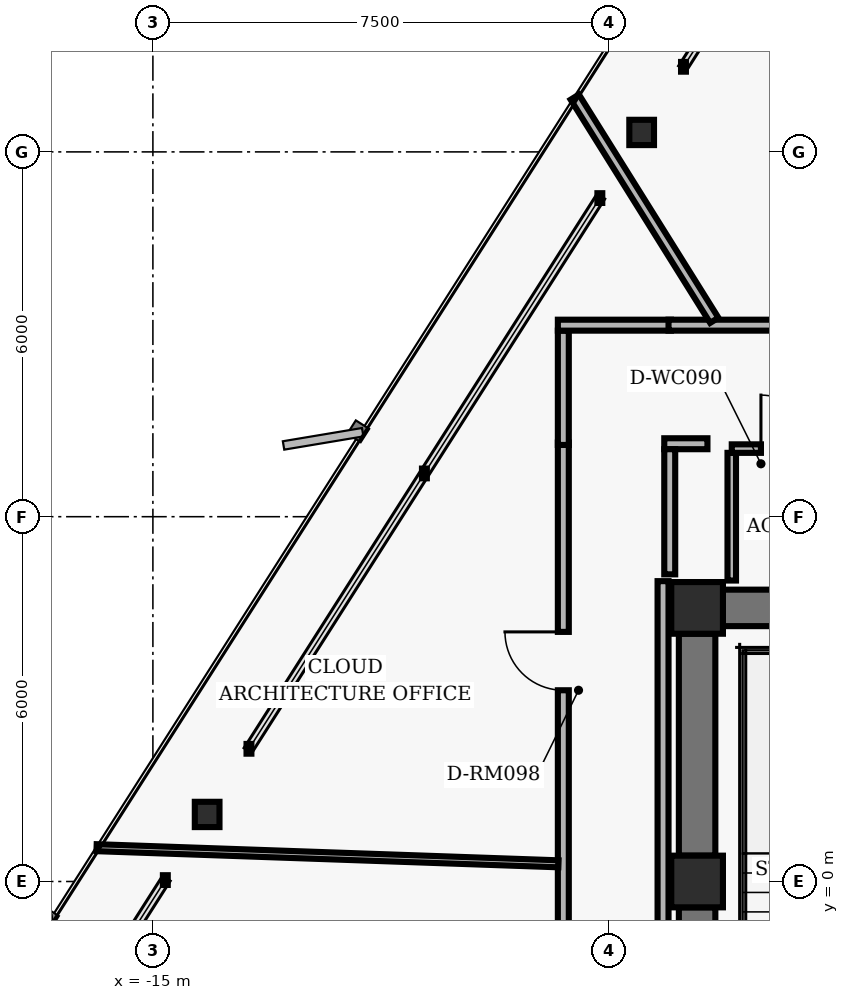
"""IFC4 building model, lengths in metres.
Left out: names, types, materials, properties, quantities, classifications, styles, units other than length and angle.
Written with IfcOpenShell. Run it as: python <this file> out.ifc"""

import sys

from ifc_helpers import new_model, si_unit, direction, frame, frame_2d, origin, origin_2d, place, context, subcontext, project, spatial, rectangle, hollow_rectangle, i_section, extrude, element, fill, save


model = new_model("IFC4")
c1 = context("Model", 3, precision=1e-05, world=origin(), true_north=direction((0.0, 1.0)))
c2 = subcontext(c1, "Body", "Model", "MODEL_VIEW")
j1 = project(units=[si_unit("LENGTHUNIT", "METRE"), si_unit("PLANEANGLEUNIT", "RADIAN")], contexts=[c1])
p1 = place(None, origin())
s1 = spatial("IfcSite", under=j1, at=p1, CompositionType="ELEMENT")
p2 = place(p1, origin())
s2 = spatial("IfcBuilding", under=s1, at=p2, CompositionType="ELEMENT")
p3 = place(p2, frame((0.0, 0.0, 135.04)))
s3 = spatial("IfcBuildingStorey", under=s2, at=p3, CompositionType="ELEMENT", Elevation=135.04)
for number, where, z_axis, x_axis in (
    (1, (-6.05, 4.5, 0.0), (0.0, 0.0, 1.0), (1.0, 0.0, 0.0)),
    (2, (-6.05, 0.0, 0.0), (0.0, 0.0, 1.0), (1.0, 0.0, 0.0)),
):
    element("IfcColumn", number, at=place(p3, frame(where, z_axis=z_axis, x_axis=x_axis)), inside=s3, PredefinedType="COLUMN", context=c2, shape_type="SweptSolid", body=[
        extrude(hollow_rectangle(XDim=0.85, YDim=0.85, WallThickness=0.055, InnerFilletRadius=0.02, OuterFilletRadius=0.04, at=origin_2d()), origin(), (0.0, 0.0, 1.0), 3.04),
    ])
p4 = place(p3, frame((-6.05, 0.425, 0.0), z_axis=(0.0, 0.0, 1.0), x_axis=(0.0, 1.0, 0.0)))
e3 = element("IfcWall", 3, at=p4, inside=s3, PredefinedType="SHEAR", context=c2, shape_type="SweptSolid", body=[
    extrude(rectangle(XDim=3.65, YDim=0.6, at=frame_2d((1.825, 0.0))), origin(), (0.0, 0.0, 1.0), 2.788),
])
p5 = place(p3, frame((-6.05, -3.875, 0.0), z_axis=(0.0, 0.0, 1.0), x_axis=(0.0, 1.0, 0.0)))
e4 = element("IfcWall", 4, at=p5, inside=s3, PredefinedType="SHEAR", context=c2, shape_type="SweptSolid", body=[
    extrude(rectangle(XDim=3.45, YDim=0.6, at=frame_2d((1.725, 0.0))), origin(), (0.0, 0.0, 1.0), 2.788),
])
p6 = place(p3, frame((-5.625, 4.5, 0.0), z_axis=(0.0, 0.0, 1.0), x_axis=(1.0, 0.0, 0.0)))
e5 = element("IfcWall", 5, at=p6, inside=s3, PredefinedType="SHEAR", context=c2, shape_type="SweptSolid", body=[
    extrude(rectangle(XDim=3.575, YDim=0.6, at=frame_2d((1.788, 0.0))), origin(), (0.0, 0.0, 1.0), 2.788),
])
for number, where, z_axis, x_axis in (
    (6, (-6.962, 12.32, 0.0), (0.0, 0.0, 1.0), (1.0, 0.0, 0.0)),
    (7, (-14.108, 1.103, 0.0), (0.0, 0.0, 1.0), (1.0, 0.0, 0.0)),
):
    element("IfcColumn", number, at=place(p3, frame(where, z_axis=z_axis, x_axis=x_axis)), inside=s3, PredefinedType="COLUMN", context=c2, shape_type="SweptSolid", body=[
        extrude(i_section(OverallWidth=0.406, OverallDepth=0.416, WebThickness=0.03, FlangeThickness=0.048, FilletRadius=0.02, at=origin_2d()), origin(), (0.0, 0.0, 1.0), 3.04),
    ])
p7 = place(p3, frame((-5.48, 4.95, 0.0), z_axis=(0.0, 0.0, 1.0), x_axis=(0.0, 1.0, 0.0)))
e8 = element("IfcWall", 8, at=p7, inside=s3, PredefinedType="PARTITIONING", context=c2, shape_type="SweptSolid", body=[
    extrude(rectangle(XDim=2.1, YDim=0.14, at=frame_2d((1.05, 0.0))), origin(), (0.0, 0.0, 1.0), 2.763),
])
p8 = place(p3, frame((-5.48, 7.12, 0.0), z_axis=(0.0, 0.0, 1.0), x_axis=(1.0, 0.0, 0.0)))
e9 = element("IfcWall", 9, at=p8, inside=s3, PredefinedType="PARTITIONING", context=c2, shape_type="SweptSolid", body=[
    extrude(rectangle(XDim=3.36, YDim=0.14, at=frame_2d((1.68, 0.0))), origin(), (0.0, 0.0, 1.0), 2.33),
])
p9 = place(p8, frame((0.48, 0.0, 0.0)))
e10 = element("IfcOpeningElement", 10, at=p9, cuts=e9, PredefinedType="OPENING", context=c2, shape_type="SweptSolid", body=[
    extrude(rectangle(XDim=0.88, YDim=2.02, at=frame_2d((0.44, 1.01))), frame((0.0, 0.08, 0.0), z_axis=(0.0, -1.0, 0.0), x_axis=(1.0, 0.0, 0.0)), (0.0, 0.0, 1.0), 0.16),
])
p10 = place(p8, frame((2.22, 0.0, 0.0)))
e11 = element("IfcOpeningElement", 11, at=p10, cuts=e9, PredefinedType="OPENING", context=c2, shape_type="SweptSolid", body=[
    extrude(rectangle(XDim=0.88, YDim=2.02, at=frame_2d((0.44, 1.01))), frame((0.0, 0.08, 0.0), z_axis=(0.0, -1.0, 0.0), x_axis=(1.0, 0.0, 0.0)), (0.0, 0.0, 1.0), 0.16),
])
p11 = place(p3, frame((-8.25, -7.22, 0.0), z_axis=(0.0, 0.0, 1.0), x_axis=(0.0, 1.0, 0.0)))
e12 = element("IfcWall", 12, at=p11, inside=s3, PredefinedType="PARTITIONING", context=c2, shape_type="SweptSolid", body=[
    extrude(rectangle(XDim=14.44, YDim=0.18, at=frame_2d((7.22, 0.0))), origin(), (0.0, 0.0, 1.0), 2.763),
])
p12 = place(p11, frame((3.406, 0.0, 0.0)))
e13 = element("IfcOpeningElement", 13, at=p12, cuts=e12, PredefinedType="OPENING", context=c2, shape_type="SweptSolid", body=[
    extrude(rectangle(XDim=0.96, YDim=2.02, at=frame_2d((0.48, 1.01))), frame((0.0, 0.1, 0.0), z_axis=(0.0, -1.0, 0.0), x_axis=(1.0, 0.0, 0.0)), (0.0, 0.0, 1.0), 0.2),
])
p13 = place(p11, frame((10.365, 0.0, 0.0)))
e14 = element("IfcOpeningElement", 14, at=p13, cuts=e12, PredefinedType="OPENING", context=c2, shape_type="SweptSolid", body=[
    extrude(rectangle(XDim=0.96, YDim=2.02, at=frame_2d((0.48, 1.01))), frame((0.0, 0.1, 0.0), z_axis=(0.0, -1.0, 0.0), x_axis=(1.0, 0.0, 0.0)), (0.0, 0.0, 1.0), 0.2),
])
p14 = place(p3, frame((-8.25, 7.18, 0.0), z_axis=(0.0, 0.0, 1.0), x_axis=(0.0, 1.0, 0.0)))
e15 = element("IfcWall", 15, at=p14, inside=s3, PredefinedType="PARTITIONING", context=c2, shape_type="SweptSolid", body=[
    extrude(rectangle(XDim=1.88, YDim=0.18, at=frame_2d((0.94, 0.0))), origin(), (0.0, 0.0, 1.0), 2.763),
])
p15 = place(p3, frame((-8.34, 9.15, 0.0), z_axis=(0.0, 0.0, 1.0), x_axis=(1.0, 0.0, 0.0)))
e16 = element("IfcWall", 16, at=p15, inside=s3, PredefinedType="PARTITIONING", context=c2, shape_type="SweptSolid", body=[
    extrude(rectangle(XDim=1.86, YDim=0.18, at=frame_2d((0.93, 0.0))), origin(), (0.0, 0.0, 1.0), 2.763),
])
p16 = place(p3, frame((-6.52, 9.15, 0.0), z_axis=(0.0, 0.0, 1.0), x_axis=(1.0, 0.0, 0.0)))
e17 = element("IfcWall", 17, at=p16, inside=s3, PredefinedType="PARTITIONING", context=c2, shape_type="SweptSolid", body=[
    extrude(rectangle(XDim=16.572, YDim=0.18, at=frame_2d((8.286, 0.0))), origin(), (0.0, 0.0, 1.0), 2.33),
])
p17 = place(p16, frame((5.789, 0.0, 0.0)))
e18 = element("IfcOpeningElement", 18, at=p17, cuts=e17, PredefinedType="OPENING", context=c2, shape_type="SweptSolid", body=[
    extrude(rectangle(XDim=1.02, YDim=2.02, at=frame_2d((0.51, 1.01))), frame((0.0, 0.1, 0.0), z_axis=(0.0, -1.0, 0.0), x_axis=(1.0, 0.0, 0.0)), (0.0, 0.0, 1.0), 0.2),
])
p18 = place(p3, frame((-5.88, 7.2, 0.0), z_axis=(0.0, 0.0, 1.0), x_axis=(-1.0, 0.0, 0.0)))
e19 = element("IfcWall", 19, at=p18, inside=s3, PredefinedType="PARTITIONING", context=c2, shape_type="SweptSolid", body=[
    extrude(rectangle(XDim=0.71, YDim=0.18, at=frame_2d((0.355, 0.0))), origin(), (0.0, 0.0, 1.0), 2.33),
])
p19 = place(p3, frame((-6.5, 7.11, 0.0), z_axis=(0.0, 0.0, 1.0), x_axis=(0.0, -1.0, 0.0)))
e20 = element("IfcWall", 20, at=p19, inside=s3, PredefinedType="PARTITIONING", context=c2, shape_type="SweptSolid", body=[
    extrude(rectangle(XDim=2.058, YDim=0.18, at=frame_2d((1.029, 0.0))), origin(), (0.0, 0.0, 1.0), 2.132),
])
p20 = place(p3, frame((-6.61, 4.94, 0.0), z_axis=(0.0, 0.0, 1.0), x_axis=(0.0, -1.0, 0.0)))
e21 = element("IfcWall", 21, at=p20, inside=s3, PredefinedType="PARTITIONING", context=c2, shape_type="SweptSolid", body=[
    extrude(rectangle(XDim=9.46, YDim=0.18, at=frame_2d((4.73, 0.0))), origin(), (0.0, 0.0, 1.0), 2.763),
])
p21 = place(p3, frame((-5.768, 9.23, 0.0), z_axis=(0.0, 0.0, 1.0), x_axis=(-0.529887412725, 0.848067998356, 0.0)))
e22 = element("IfcWall", 22, at=p21, inside=s3, PredefinedType="PARTITIONING", context=c2, shape_type="SweptSolid", body=[
    extrude(rectangle(XDim=4.329, YDim=0.16, at=frame_2d((2.165, 0.0))), origin(), (0.0, 0.0, 1.0), 2.763),
])
p22 = place(p3, frame((-8.33, 0.291, 0.0), z_axis=(0.0, 0.0, 1.0), x_axis=(-0.999391414835, 0.034882659784, 0.0)))
e23 = element("IfcWall", 23, at=p22, inside=s3, PredefinedType="MOVABLE", context=c2, shape_type="SweptSolid", body=[
    extrude(rectangle(XDim=7.601, YDim=0.115, at=frame_2d((3.8, 0.0))), origin(), (0.0, 0.0, 1.0), 2.132),
])
p23 = place(p9, origin())
e24 = element("IfcDoor", 24, at=p23, inside=s3, OperationType="SINGLE_SWING_LEFT", PredefinedType="DOOR", context=c2, shape_type="SweptSolid", body=[
    extrude(rectangle(XDim=0.88, YDim=2.02, at=frame_2d((0.44, 1.01))), frame((0.0, 0.025, 0.0), z_axis=(0.0, -1.0, 0.0), x_axis=(1.0, 0.0, 0.0)), (0.0, 0.0, 1.0), 0.05),
])
fill(e10, e24)
p24 = place(p13, origin())
e25 = element("IfcDoor", 25, at=p24, inside=s3, OperationType="SINGLE_SWING_RIGHT", PredefinedType="DOOR", context=c2, shape_type="SweptSolid", body=[
    extrude(rectangle(XDim=0.96, YDim=2.02, at=frame_2d((0.48, 1.01))), frame((0.0, 0.025, 0.0), z_axis=(0.0, -1.0, 0.0), x_axis=(1.0, 0.0, 0.0)), (0.0, 0.0, 1.0), 0.05),
])
fill(e14, e25)
save(model, sys.argv[1])
